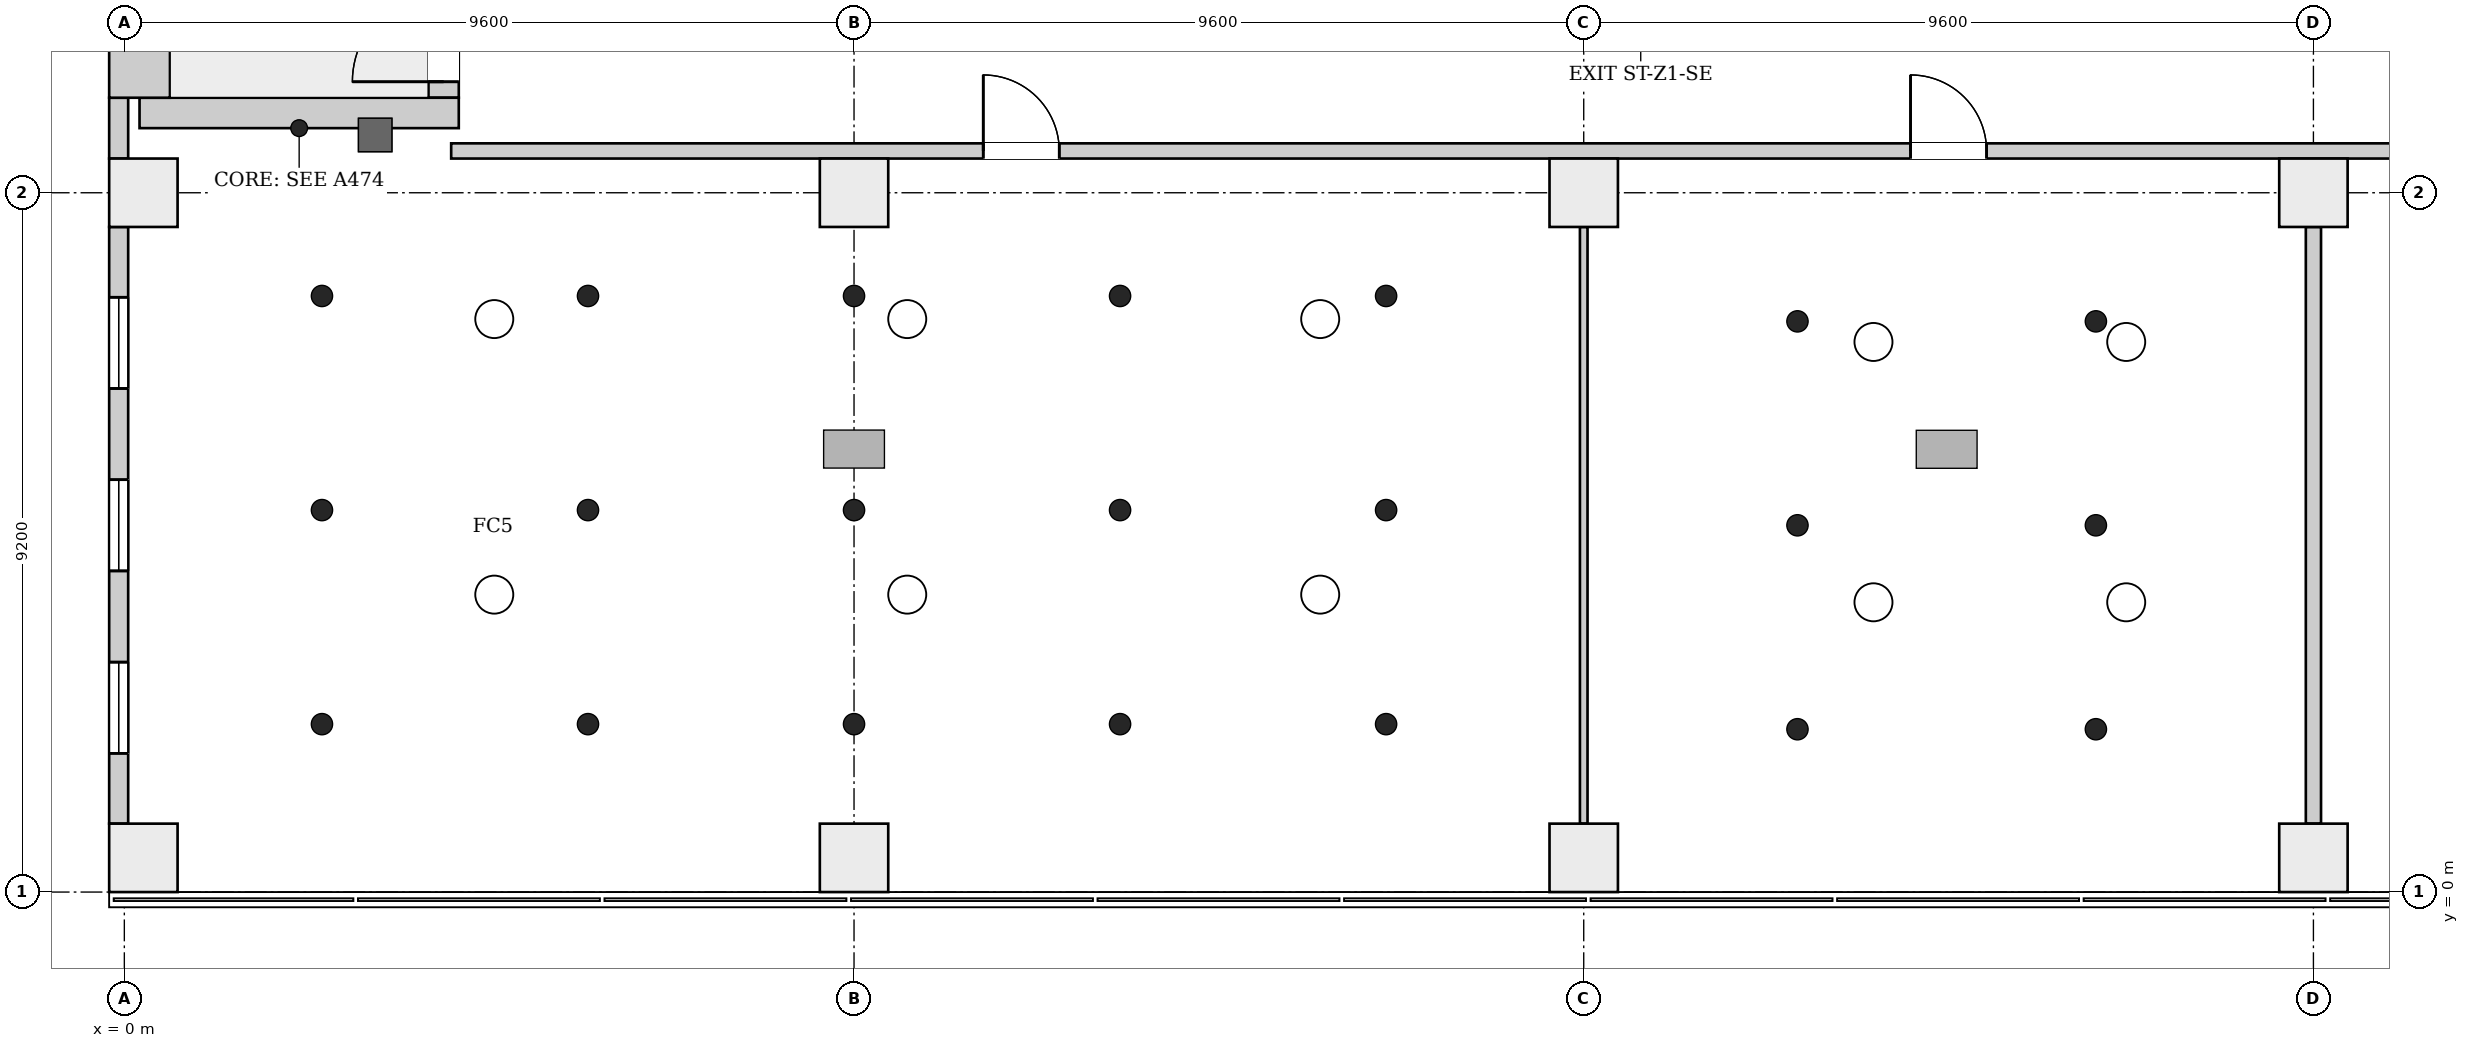
"""IFC4 building model, lengths in metres.
Left out: names, types, materials, properties, quantities, classifications, styles, units other than length and angle.
Written with IfcOpenShell. Run it as: python <this file> out.ifc"""

import sys

from ifc_helpers import new_model, si_unit, direction, frame, frame_2d, origin, origin_2d, place, context, subcontext, project, spatial, rectangle, extrude, element, fill, save


model = new_model("IFC4")
c1 = context("Model", 3, precision=1e-05, world=origin(), true_north=direction((0.0, 1.0)))
c2 = subcontext(c1, "Body", "Model", "MODEL_VIEW")
j1 = project(units=[si_unit("LENGTHUNIT", "METRE"), si_unit("PLANEANGLEUNIT", "RADIAN")], contexts=[c1])
p1 = place(None, origin())
s1 = spatial("IfcSite", under=j1, at=p1, CompositionType="ELEMENT")
p2 = place(p1, origin())
s2 = spatial("IfcBuilding", under=s1, at=p2, CompositionType="ELEMENT")
p3 = place(p2, frame((0.0, 0.0, 48.7)))
s3 = spatial("IfcBuildingStorey", under=s2, at=p3, CompositionType="ELEMENT", Elevation=48.7)
p4 = place(p3, frame((0.2, 10.25, 0.0), z_axis=(0.0, 0.0, 1.0), x_axis=(1.0, 0.0, 0.0)))
e1 = element("IfcWall", 1, at=p4, inside=s3, PredefinedType="SHEAR", context=c2, shape_type="SweptSolid", body=[
    extrude(rectangle(XDim=4.2, YDim=0.4, at=frame_2d((2.1, 0.0))), origin(), (0.0, 0.0, 1.0), 4.2),
])
p5 = place(p3, frame((0.2, 10.45, 0.0), z_axis=(0.0, 0.0, 1.0), x_axis=(0.0, 1.0, 0.0)))
e2 = element("IfcWall", 2, at=p5, inside=s3, PredefinedType="SHEAR", context=c2, shape_type="SweptSolid", body=[
    extrude(rectangle(XDim=6.6, YDim=0.8, at=frame_2d((3.3, 0.0))), origin(), (0.0, 0.0, 1.0), 4.2),
])
p6 = place(p3, frame((4.2, 10.45, 0.0), z_axis=(0.0, 0.0, 1.0), x_axis=(0.0, 1.0, 0.0)))
e3 = element("IfcWall", 3, at=p6, inside=s3, PredefinedType="SHEAR", context=c2, shape_type="SweptSolid", body=[
    extrude(rectangle(XDim=6.6, YDim=0.4, at=frame_2d((3.3, 0.0))), origin(), (0.0, 0.0, 1.0), 4.2),
])
p7 = place(p6, frame((0.21, 0.0, 0.0)))
e4 = element("IfcOpeningElement", 4, at=p7, cuts=e3, PredefinedType="OPENING", context=c2, shape_type="SweptSolid", body=[
    extrude(rectangle(XDim=1.2, YDim=2.1, at=frame_2d((0.6, 1.05))), frame((0.0, 0.21, 0.0), z_axis=(0.0, -1.0, 0.0), x_axis=(1.0, 0.0, 0.0)), (0.0, 0.0, 1.0), 0.42),
])
for number, where, z_axis, x_axis in (
    (5, (0.25, 0.45, 0.0), (0.0, 0.0, 1.0), (1.0, 0.0, 0.0)),
    (6, (9.6, 0.45, 0.0), (0.0, 0.0, 1.0), (1.0, 0.0, 0.0)),
    (7, (19.2, 0.45, 0.0), (0.0, 0.0, 1.0), (1.0, 0.0, 0.0)),
    (8, (28.8, 0.45, 0.0), (0.0, 0.0, 1.0), (1.0, 0.0, 0.0)),
    (9, (0.25, 9.2, 0.0), (0.0, 0.0, 1.0), (1.0, 0.0, 0.0)),
    (10, (9.6, 9.2, 0.0), (0.0, 0.0, 1.0), (1.0, 0.0, 0.0)),
    (11, (19.2, 9.2, 0.0), (0.0, 0.0, 1.0), (1.0, 0.0, 0.0)),
    (12, (28.8, 9.2, 0.0), (0.0, 0.0, 1.0), (1.0, 0.0, 0.0)),
):
    element("IfcColumn", number, at=place(p3, frame(where, z_axis=z_axis, x_axis=x_axis)), inside=s3, PredefinedType="COLUMN", context=c2, shape_type="SweptSolid", body=[
        extrude(rectangle(XDim=0.9, YDim=0.9, at=origin_2d()), origin(), (0.0, 0.0, 1.0), 4.2),
    ])
p8 = place(p3, frame((-0.074, 8.75, 0.0), z_axis=(0.0, 0.0, 1.0), x_axis=(0.0, -1.0, 0.0)))
e13 = element("IfcWall", 13, at=p8, inside=s3, PredefinedType="ELEMENTEDWALL", context=c2, shape_type="SweptSolid", body=[
    extrude(rectangle(XDim=7.85, YDim=0.25, at=frame_2d((3.925, 0.0))), origin(), (0.0, 0.0, 1.0), 3.9),
])
p9 = place(p8, frame((5.725, 0.0, 0.9)))
e14 = element("IfcOpeningElement", 14, at=p9, cuts=e13, PredefinedType="OPENING", context=c2, shape_type="SweptSolid", body=[
    extrude(rectangle(XDim=1.2, YDim=2.6, at=frame_2d((0.6, 1.3))), frame((0.0, 0.135, 0.0), z_axis=(0.0, -1.0, 0.0), x_axis=(1.0, 0.0, 0.0)), (0.0, 0.0, 1.0), 0.27),
])
p10 = place(p8, frame((3.325, 0.0, 0.9)))
e15 = element("IfcOpeningElement", 15, at=p10, cuts=e13, PredefinedType="OPENING", context=c2, shape_type="SweptSolid", body=[
    extrude(rectangle(XDim=1.2, YDim=2.6, at=frame_2d((0.6, 1.3))), frame((0.0, 0.135, 0.0), z_axis=(0.0, -1.0, 0.0), x_axis=(1.0, 0.0, 0.0)), (0.0, 0.0, 1.0), 0.27),
])
p11 = place(p8, frame((0.925, 0.0, 0.9)))
e16 = element("IfcOpeningElement", 16, at=p11, cuts=e13, PredefinedType="OPENING", context=c2, shape_type="SweptSolid", body=[
    extrude(rectangle(XDim=1.2, YDim=2.6, at=frame_2d((0.6, 1.3))), frame((0.0, 0.135, 0.0), z_axis=(0.0, -1.0, 0.0), x_axis=(1.0, 0.0, 0.0)), (0.0, 0.0, 1.0), 0.27),
])
p12 = place(p3, frame((-0.074, 10.45, 0.0), z_axis=(0.0, 0.0, 1.0), x_axis=(0.0, -1.0, 0.0)))
e17 = element("IfcWall", 17, at=p12, inside=s3, PredefinedType="ELEMENTEDWALL", context=c2, shape_type="SweptSolid", body=[
    extrude(rectangle(XDim=0.8, YDim=0.25, at=frame_2d((0.4, 0.0))), origin(), (0.0, 0.0, 1.0), 3.9),
])
p13 = place(p3, frame((4.3, 9.75, 0.0), z_axis=(0.0, 0.0, 1.0), x_axis=(1.0, 0.0, 0.0)))
e18 = element("IfcWall", 18, at=p13, inside=s3, PredefinedType="PARTITIONING", context=c2, shape_type="SweptSolid", body=[
    extrude(rectangle(XDim=43.894, YDim=0.2, at=frame_2d((21.947, 0.0))), origin(), (0.0, 0.0, 1.0), 3.9),
])
p14 = place(p13, frame((7.0, 0.0, 0.0)))
e19 = element("IfcOpeningElement", 19, at=p14, cuts=e18, PredefinedType="OPENING", context=c2, shape_type="SweptSolid", body=[
    extrude(rectangle(XDim=1.0, YDim=2.1, at=frame_2d((0.5, 1.05))), frame((0.0, 0.11, 0.0), z_axis=(0.0, -1.0, 0.0), x_axis=(1.0, 0.0, 0.0)), (0.0, 0.0, 1.0), 0.22),
])
p15 = place(p13, frame((19.2, 0.0, 0.0)))
e20 = element("IfcOpeningElement", 20, at=p15, cuts=e18, PredefinedType="OPENING", context=c2, shape_type="SweptSolid", body=[
    extrude(rectangle(XDim=1.0, YDim=2.1, at=frame_2d((0.5, 1.05))), frame((0.0, 0.11, 0.0), z_axis=(0.0, -1.0, 0.0), x_axis=(1.0, 0.0, 0.0)), (0.0, 0.0, 1.0), 0.22),
])
p16 = place(p13, frame((30.95, 0.0, 0.0)))
e21 = element("IfcOpeningElement", 21, at=p16, cuts=e18, PredefinedType="OPENING", context=c2, shape_type="SweptSolid", body=[
    extrude(rectangle(XDim=1.5, YDim=2.1, at=frame_2d((0.75, 1.05))), frame((0.0, 0.11, 0.0), z_axis=(0.0, -1.0, 0.0), x_axis=(1.0, 0.0, 0.0)), (0.0, 0.0, 1.0), 0.22),
])
p17 = place(p13, frame((40.9, 0.0, 0.0)))
e22 = element("IfcOpeningElement", 22, at=p17, cuts=e18, PredefinedType="OPENING", context=c2, shape_type="SweptSolid", body=[
    extrude(rectangle(XDim=1.0, YDim=2.1, at=frame_2d((0.5, 1.05))), frame((0.0, 0.11, 0.0), z_axis=(0.0, -1.0, 0.0), x_axis=(1.0, 0.0, 0.0)), (0.0, 0.0, 1.0), 0.22),
])
p18 = place(p3, frame((19.2, 0.9, 0.0), z_axis=(0.0, 0.0, 1.0), x_axis=(0.0, 1.0, 0.0)))
e23 = element("IfcWall", 23, at=p18, inside=s3, PredefinedType="PARTITIONING", context=c2, shape_type="SweptSolid", body=[
    extrude(rectangle(XDim=7.85, YDim=0.1, at=frame_2d((3.925, 0.0))), origin(), (0.0, 0.0, 1.0), 3.9),
])
p19 = place(p3, frame((28.8, 0.9, 0.0), z_axis=(0.0, 0.0, 1.0), x_axis=(0.0, 1.0, 0.0)))
e24 = element("IfcWall", 24, at=p19, inside=s3, PredefinedType="PARTITIONING", context=c2, shape_type="SweptSolid", body=[
    extrude(rectangle(XDim=7.85, YDim=0.2, at=frame_2d((3.925, 0.0))), origin(), (0.0, 0.0, 1.0), 3.9),
])
p20 = place(p9, origin())
e25 = element("IfcWindow", 25, at=p20, inside=s3, PartitioningType="SINGLE_PANEL", PredefinedType="WINDOW", context=c2, shape_type="SweptSolid", body=[
    extrude(rectangle(XDim=1.2, YDim=2.6, at=frame_2d((0.6, 1.3))), frame((0.0, 0.03, 0.0), z_axis=(0.0, -1.0, 0.0), x_axis=(1.0, 0.0, 0.0)), (0.0, 0.0, 1.0), 0.06),
])
fill(e14, e25)
p21 = place(p10, origin())
e26 = element("IfcWindow", 26, at=p21, inside=s3, PartitioningType="SINGLE_PANEL", PredefinedType="WINDOW", context=c2, shape_type="SweptSolid", body=[
    extrude(rectangle(XDim=1.2, YDim=2.6, at=frame_2d((0.6, 1.3))), frame((0.0, 0.03, 0.0), z_axis=(0.0, -1.0, 0.0), x_axis=(1.0, 0.0, 0.0)), (0.0, 0.0, 1.0), 0.06),
])
fill(e15, e26)
p22 = place(p11, origin())
e27 = element("IfcWindow", 27, at=p22, inside=s3, PartitioningType="SINGLE_PANEL", PredefinedType="WINDOW", context=c2, shape_type="SweptSolid", body=[
    extrude(rectangle(XDim=1.2, YDim=2.6, at=frame_2d((0.6, 1.3))), frame((0.0, 0.03, 0.0), z_axis=(0.0, -1.0, 0.0), x_axis=(1.0, 0.0, 0.0)), (0.0, 0.0, 1.0), 0.06),
])
fill(e16, e27)
p23 = place(p7, origin())
e28 = element("IfcDoor", 28, at=p23, inside=s3, OperationType="SINGLE_SWING_RIGHT", PredefinedType="DOOR", context=c2, shape_type="SweptSolid", body=[
    extrude(rectangle(XDim=1.2, YDim=2.1, at=frame_2d((0.6, 1.05))), frame((0.0, 0.025, 0.0), z_axis=(0.0, -1.0, 0.0), x_axis=(1.0, 0.0, 0.0)), (0.0, 0.0, 1.0), 0.05),
])
fill(e4, e28)
p24 = place(p14, origin())
e29 = element("IfcDoor", 29, at=p24, inside=s3, OperationType="SINGLE_SWING_RIGHT", PredefinedType="DOOR", context=c2, shape_type="SweptSolid", body=[
    extrude(rectangle(XDim=1.0, YDim=2.1, at=frame_2d((0.5, 1.05))), frame((0.0, 0.025, 0.0), z_axis=(0.0, -1.0, 0.0), x_axis=(1.0, 0.0, 0.0)), (0.0, 0.0, 1.0), 0.05),
])
fill(e19, e29)
p25 = place(p15, origin())
e30 = element("IfcDoor", 30, at=p25, inside=s3, OperationType="SINGLE_SWING_RIGHT", PredefinedType="DOOR", context=c2, shape_type="SweptSolid", body=[
    extrude(rectangle(XDim=1.0, YDim=2.1, at=frame_2d((0.5, 1.05))), frame((0.0, 0.025, 0.0), z_axis=(0.0, -1.0, 0.0), x_axis=(1.0, 0.0, 0.0)), (0.0, 0.0, 1.0), 0.05),
])
fill(e20, e30)
save(model, sys.argv[1])
